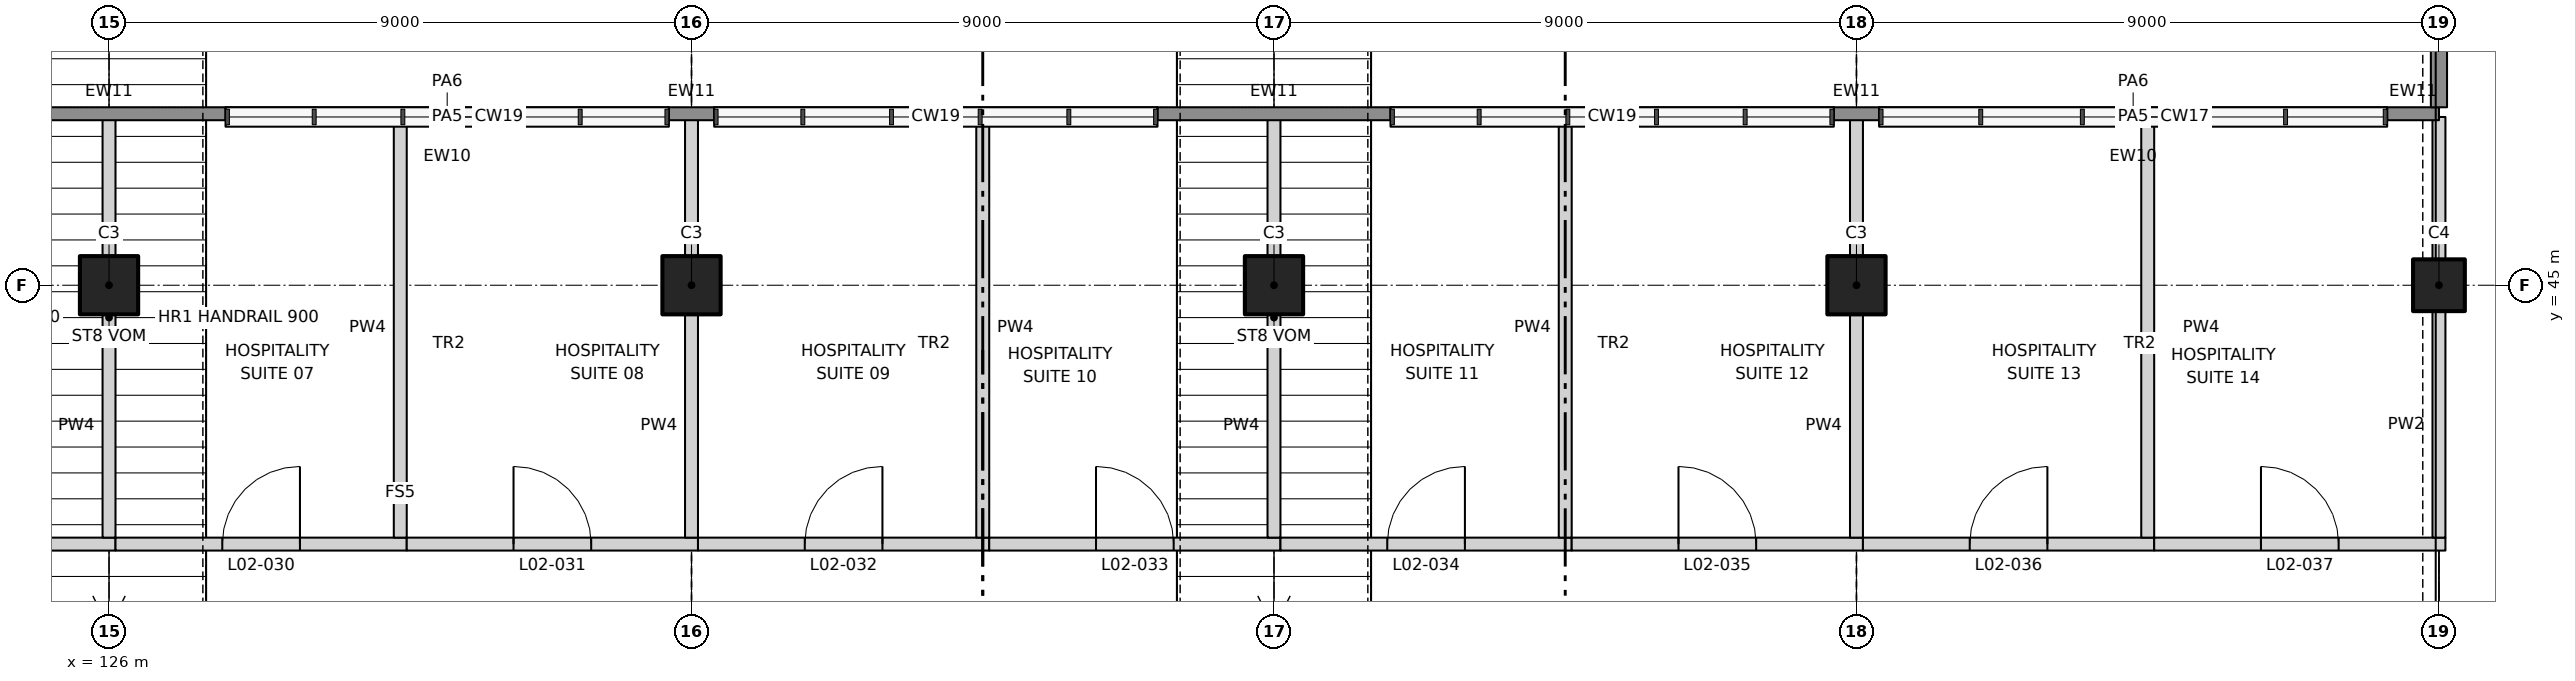
"""IFC4 building model, lengths in metres.
Left out: names, types, materials, properties, quantities, classifications, styles, units other than length and angle.
Written with IfcOpenShell. Run it as: python <this file> out.ifc"""

import sys

from ifc_helpers import new_model, si_unit, direction, frame, frame_2d, origin, origin_2d, place, context, subcontext, project, spatial, polyline, rectangle, outline, extrude, element, fill, save


model = new_model("IFC4")
c1 = context("Model", 3, precision=1e-05, world=origin(), true_north=direction((0.0, 1.0)))
c2 = subcontext(c1, "Body", "Model", "MODEL_VIEW")
j1 = project(units=[si_unit("LENGTHUNIT", "METRE"), si_unit("PLANEANGLEUNIT", "RADIAN")], contexts=[c1])
p1 = place(None, origin())
s1 = spatial("IfcSite", under=j1, at=p1, CompositionType="ELEMENT")
p2 = place(p1, origin())
s2 = spatial("IfcBuilding", under=s1, at=p2, CompositionType="ELEMENT")
p3 = place(p2, frame((0.0, 0.0, 11.5)))
s3 = spatial("IfcBuildingStorey", under=s2, at=p3, CompositionType="ELEMENT", Elevation=11.5)
p4 = place(p3, frame((162.0, 45.0, 0.0), z_axis=(0.0, 0.0, 1.0), x_axis=(1.0, 0.0, 0.0)))
e1 = element("IfcColumn", 1, at=p4, inside=s3, PredefinedType="COLUMN", context=c2, shape_type="SweptSolid", body=[
    extrude(rectangle(XDim=0.8, YDim=0.8, at=origin_2d()), origin(), (0.0, 0.0, 1.0), 10.5),
])
for number, where, z_axis, x_axis in (
    (2, (126.0, 45.0, 0.0), (0.0, 0.0, 1.0), (1.0, 0.0, 0.0)),
    (3, (135.0, 45.0, 0.0), (0.0, 0.0, 1.0), (1.0, 0.0, 0.0)),
    (4, (144.0, 45.0, 0.0), (0.0, 0.0, 1.0), (1.0, 0.0, 0.0)),
    (5, (153.0, 45.0, 0.0), (0.0, 0.0, 1.0), (1.0, 0.0, 0.0)),
):
    element("IfcColumn", number, at=place(p3, frame(where, z_axis=z_axis, x_axis=x_axis)), inside=s3, PredefinedType="COLUMN", context=c2, shape_type="SweptSolid", body=[
        extrude(rectangle(XDim=0.9, YDim=0.9, at=origin_2d()), origin(), (0.0, 0.0, 1.0), 4.506),
    ])
p5 = place(p3, frame((121.6, 41.0, 0.0), z_axis=(0.0, 0.0, 1.0), x_axis=(1.0, 0.0, 0.0)))
e6 = element("IfcWall", 6, at=p5, inside=s3, PredefinedType="PARTITIONING", context=c2, shape_type="SweptSolid", body=[
    extrude(rectangle(XDim=4.5, YDim=0.2, at=frame_2d((2.25, 0.0))), origin(), (0.0, 0.0, 1.0), 8.258),
])
p6 = place(p5, frame((1.65, 0.0, 0.0)))
e7 = element("IfcOpeningElement", 7, at=p6, cuts=e6, PredefinedType="OPENING", context=c2, shape_type="SweptSolid", body=[
    extrude(rectangle(XDim=1.2, YDim=2.1, at=frame_2d((0.6, 1.05))), frame((0.0, 0.11, 0.0), z_axis=(0.0, -1.0, 0.0), x_axis=(1.0, 0.0, 0.0)), (0.0, 0.0, 1.0), 0.22),
])
p7 = place(p3, frame((126.1, 41.0, 0.0), z_axis=(0.0, 0.0, 1.0), x_axis=(1.0, 0.0, 0.0)))
e8 = element("IfcWall", 8, at=p7, inside=s3, PredefinedType="PARTITIONING", context=c2, shape_type="SweptSolid", body=[
    extrude(rectangle(XDim=4.5, YDim=0.2, at=frame_2d((2.25, 0.0))), origin(), (0.0, 0.0, 1.0), 8.258),
])
p8 = place(p7, frame((1.65, 0.0, 0.0)))
e9 = element("IfcOpeningElement", 9, at=p8, cuts=e8, PredefinedType="OPENING", context=c2, shape_type="SweptSolid", body=[
    extrude(rectangle(XDim=1.2, YDim=2.1, at=frame_2d((0.6, 1.05))), frame((0.0, 0.11, 0.0), z_axis=(0.0, -1.0, 0.0), x_axis=(1.0, 0.0, 0.0)), (0.0, 0.0, 1.0), 0.22),
])
p9 = place(p3, frame((130.6, 41.0, 0.0), z_axis=(0.0, 0.0, 1.0), x_axis=(1.0, 0.0, 0.0)))
e10 = element("IfcWall", 10, at=p9, inside=s3, PredefinedType="PARTITIONING", context=c2, shape_type="SweptSolid", body=[
    extrude(rectangle(XDim=4.5, YDim=0.2, at=frame_2d((2.25, 0.0))), origin(), (0.0, 0.0, 1.0), 8.258),
])
p10 = place(p9, frame((1.65, 0.0, 0.0)))
e11 = element("IfcOpeningElement", 11, at=p10, cuts=e10, PredefinedType="OPENING", context=c2, shape_type="SweptSolid", body=[
    extrude(rectangle(XDim=1.2, YDim=2.1, at=frame_2d((0.6, 1.05))), frame((0.0, 0.11, 0.0), z_axis=(0.0, -1.0, 0.0), x_axis=(1.0, 0.0, 0.0)), (0.0, 0.0, 1.0), 0.22),
])
p11 = place(p3, frame((135.1, 41.0, 0.0), z_axis=(0.0, 0.0, 1.0), x_axis=(1.0, 0.0, 0.0)))
e12 = element("IfcWall", 12, at=p11, inside=s3, PredefinedType="PARTITIONING", context=c2, shape_type="SweptSolid", body=[
    extrude(rectangle(XDim=4.5, YDim=0.2, at=frame_2d((2.25, 0.0))), origin(), (0.0, 0.0, 1.0), 8.258),
])
p12 = place(p11, frame((1.65, 0.0, 0.0)))
e13 = element("IfcOpeningElement", 13, at=p12, cuts=e12, PredefinedType="OPENING", context=c2, shape_type="SweptSolid", body=[
    extrude(rectangle(XDim=1.2, YDim=2.1, at=frame_2d((0.6, 1.05))), frame((0.0, 0.11, 0.0), z_axis=(0.0, -1.0, 0.0), x_axis=(1.0, 0.0, 0.0)), (0.0, 0.0, 1.0), 0.22),
])
p13 = place(p3, frame((139.6, 41.0, 0.0), z_axis=(0.0, 0.0, 1.0), x_axis=(1.0, 0.0, 0.0)))
e14 = element("IfcWall", 14, at=p13, inside=s3, PredefinedType="PARTITIONING", context=c2, shape_type="SweptSolid", body=[
    extrude(rectangle(XDim=4.5, YDim=0.2, at=frame_2d((2.25, 0.0))), origin(), (0.0, 0.0, 1.0), 8.258),
])
p14 = place(p13, frame((1.65, 0.0, 0.0)))
e15 = element("IfcOpeningElement", 15, at=p14, cuts=e14, PredefinedType="OPENING", context=c2, shape_type="SweptSolid", body=[
    extrude(rectangle(XDim=1.2, YDim=2.1, at=frame_2d((0.6, 1.05))), frame((0.0, 0.11, 0.0), z_axis=(0.0, -1.0, 0.0), x_axis=(1.0, 0.0, 0.0)), (0.0, 0.0, 1.0), 0.22),
])
p15 = place(p3, frame((144.1, 41.0, 0.0), z_axis=(0.0, 0.0, 1.0), x_axis=(1.0, 0.0, 0.0)))
e16 = element("IfcWall", 16, at=p15, inside=s3, PredefinedType="PARTITIONING", context=c2, shape_type="SweptSolid", body=[
    extrude(rectangle(XDim=4.5, YDim=0.2, at=frame_2d((2.25, 0.0))), origin(), (0.0, 0.0, 1.0), 8.258),
])
p16 = place(p15, frame((1.65, 0.0, 0.0)))
e17 = element("IfcOpeningElement", 17, at=p16, cuts=e16, PredefinedType="OPENING", context=c2, shape_type="SweptSolid", body=[
    extrude(rectangle(XDim=1.2, YDim=2.1, at=frame_2d((0.6, 1.05))), frame((0.0, 0.11, 0.0), z_axis=(0.0, -1.0, 0.0), x_axis=(1.0, 0.0, 0.0)), (0.0, 0.0, 1.0), 0.22),
])
p17 = place(p3, frame((148.6, 41.0, 0.0), z_axis=(0.0, 0.0, 1.0), x_axis=(1.0, 0.0, 0.0)))
e18 = element("IfcWall", 18, at=p17, inside=s3, PredefinedType="PARTITIONING", context=c2, shape_type="SweptSolid", body=[
    extrude(rectangle(XDim=4.5, YDim=0.2, at=frame_2d((2.25, 0.0))), origin(), (0.0, 0.0, 1.0), 8.258),
])
p18 = place(p17, frame((1.65, 0.0, 0.0)))
e19 = element("IfcOpeningElement", 19, at=p18, cuts=e18, PredefinedType="OPENING", context=c2, shape_type="SweptSolid", body=[
    extrude(rectangle(XDim=1.2, YDim=2.1, at=frame_2d((0.6, 1.05))), frame((0.0, 0.11, 0.0), z_axis=(0.0, -1.0, 0.0), x_axis=(1.0, 0.0, 0.0)), (0.0, 0.0, 1.0), 0.22),
])
p19 = place(p3, frame((153.1, 41.0, 0.0), z_axis=(0.0, 0.0, 1.0), x_axis=(1.0, 0.0, 0.0)))
e20 = element("IfcWall", 20, at=p19, inside=s3, PredefinedType="PARTITIONING", context=c2, shape_type="SweptSolid", body=[
    extrude(rectangle(XDim=4.5, YDim=0.2, at=frame_2d((2.25, 0.0))), origin(), (0.0, 0.0, 1.0), 8.258),
])
p20 = place(p19, frame((1.65, 0.0, 0.0)))
e21 = element("IfcOpeningElement", 21, at=p20, cuts=e20, PredefinedType="OPENING", context=c2, shape_type="SweptSolid", body=[
    extrude(rectangle(XDim=1.2, YDim=2.1, at=frame_2d((0.6, 1.05))), frame((0.0, 0.11, 0.0), z_axis=(0.0, -1.0, 0.0), x_axis=(1.0, 0.0, 0.0)), (0.0, 0.0, 1.0), 0.22),
])
p21 = place(p3, frame((157.6, 41.0, 0.0), z_axis=(0.0, 0.0, 1.0), x_axis=(1.0, 0.0, 0.0)))
e22 = element("IfcWall", 22, at=p21, inside=s3, PredefinedType="PARTITIONING", context=c2, shape_type="SweptSolid", body=[
    extrude(outline(polyline([(0.0, 0.0), (4.5, 0.0), (4.5, 10.5), (4.0, 8.258), (0.0, 8.258), (0.0, 0.0)])), frame((0.0, 0.1, 0.0), z_axis=(0.0, -1.0, 0.0), x_axis=(1.0, 0.0, 0.0)), (0.0, 0.0, 1.0), 0.2),
])
p22 = place(p21, frame((1.65, 0.0, 0.0)))
e23 = element("IfcOpeningElement", 23, at=p22, cuts=e22, PredefinedType="OPENING", context=c2, shape_type="SweptSolid", body=[
    extrude(rectangle(XDim=1.2, YDim=2.1, at=frame_2d((0.6, 1.05))), frame((0.0, 0.11, 0.0), z_axis=(0.0, -1.0, 0.0), x_axis=(1.0, 0.0, 0.0)), (0.0, 0.0, 1.0), 0.22),
])
p23 = place(p3, frame((126.0, 41.1, 0.0), z_axis=(0.0, 0.0, 1.0), x_axis=(0.0, 1.0, 0.0)))
e24 = element("IfcWall", 24, at=p23, inside=s3, PredefinedType="PARTITIONING", context=c2, shape_type="SweptSolid", body=[
    extrude(rectangle(XDim=3.45, YDim=0.2, at=frame_2d((1.725, 0.0))), origin(), (0.0, 0.0, 1.0), 4.439),
])
p24 = place(p3, frame((126.0, 45.45, 0.0), z_axis=(0.0, 0.0, 1.0), x_axis=(0.0, 1.0, 0.0)))
e25 = element("IfcWall", 25, at=p24, inside=s3, PredefinedType="PARTITIONING", context=c2, shape_type="SweptSolid", body=[
    extrude(rectangle(XDim=2.15, YDim=0.2, at=frame_2d((1.075, 0.0))), origin(), (0.0, 0.0, 1.0), 1.939),
])
p25 = place(p3, frame((130.5, 41.1, 0.0), z_axis=(0.0, 0.0, 1.0), x_axis=(0.0, 1.0, 0.0)))
e26 = element("IfcWall", 26, at=p25, inside=s3, PredefinedType="PARTITIONING", context=c2, shape_type="SweptSolid", body=[
    extrude(outline(polyline([(0.0, 0.0), (6.5, 0.0), (6.5, 4.133), (0.0, 8.195), (0.0, 0.0)])), frame((0.0, 0.1, 0.0), z_axis=(0.0, -1.0, 0.0), x_axis=(1.0, 0.0, 0.0)), (0.0, 0.0, 1.0), 0.2),
])
p26 = place(p3, frame((135.0, 41.1, 0.0), z_axis=(0.0, 0.0, 1.0), x_axis=(0.0, 1.0, 0.0)))
e27 = element("IfcWall", 27, at=p26, inside=s3, PredefinedType="PARTITIONING", context=c2, shape_type="SweptSolid", body=[
    extrude(rectangle(XDim=3.45, YDim=0.2, at=frame_2d((1.725, 0.0))), origin(), (0.0, 0.0, 1.0), 4.439),
])
p27 = place(p3, frame((135.0, 45.45, 0.0), z_axis=(0.0, 0.0, 1.0), x_axis=(0.0, 1.0, 0.0)))
e28 = element("IfcWall", 28, at=p27, inside=s3, PredefinedType="PARTITIONING", context=c2, shape_type="SweptSolid", body=[
    extrude(outline(polyline([(0.0, 0.0), (2.15, 0.0), (2.15, 2.833), (2.079, 2.877), (0.0, 2.877), (0.0, 0.0)])), frame((0.0, 0.1, 0.0), z_axis=(0.0, -1.0, 0.0), x_axis=(1.0, 0.0, 0.0)), (0.0, 0.0, 1.0), 0.2),
])
p28 = place(p3, frame((139.5, 41.1, 0.0), z_axis=(0.0, 0.0, 1.0), x_axis=(0.0, 1.0, 0.0)))
e29 = element("IfcWall", 29, at=p28, inside=s3, PredefinedType="PARTITIONING", context=c2, shape_type="SweptSolid", body=[
    extrude(outline(polyline([(0.0, 0.0), (6.5, 0.0), (6.5, 4.133), (0.0, 8.195), (0.0, 0.0)])), frame((0.0, 0.1, 0.0), z_axis=(0.0, -1.0, 0.0), x_axis=(1.0, 0.0, 0.0)), (0.0, 0.0, 1.0), 0.2),
])
p29 = place(p3, frame((144.0, 41.1, 0.0), z_axis=(0.0, 0.0, 1.0), x_axis=(0.0, 1.0, 0.0)))
e30 = element("IfcWall", 30, at=p29, inside=s3, PredefinedType="PARTITIONING", context=c2, shape_type="SweptSolid", body=[
    extrude(rectangle(XDim=3.45, YDim=0.2, at=frame_2d((1.725, 0.0))), origin(), (0.0, 0.0, 1.0), 4.439),
])
p30 = place(p3, frame((144.0, 45.45, 0.0), z_axis=(0.0, 0.0, 1.0), x_axis=(0.0, 1.0, 0.0)))
e31 = element("IfcWall", 31, at=p30, inside=s3, PredefinedType="PARTITIONING", context=c2, shape_type="SweptSolid", body=[
    extrude(rectangle(XDim=2.15, YDim=0.2, at=frame_2d((1.075, 0.0))), origin(), (0.0, 0.0, 1.0), 1.939),
])
p31 = place(p3, frame((148.5, 41.1, 0.0), z_axis=(0.0, 0.0, 1.0), x_axis=(0.0, 1.0, 0.0)))
e32 = element("IfcWall", 32, at=p31, inside=s3, PredefinedType="PARTITIONING", context=c2, shape_type="SweptSolid", body=[
    extrude(outline(polyline([(0.0, 0.0), (6.5, 0.0), (6.5, 4.133), (0.0, 8.195), (0.0, 0.0)])), frame((0.0, 0.1, 0.0), z_axis=(0.0, -1.0, 0.0), x_axis=(1.0, 0.0, 0.0)), (0.0, 0.0, 1.0), 0.2),
])
p32 = place(p3, frame((153.0, 41.1, 0.0), z_axis=(0.0, 0.0, 1.0), x_axis=(0.0, 1.0, 0.0)))
e33 = element("IfcWall", 33, at=p32, inside=s3, PredefinedType="PARTITIONING", context=c2, shape_type="SweptSolid", body=[
    extrude(rectangle(XDim=3.45, YDim=0.2, at=frame_2d((1.725, 0.0))), origin(), (0.0, 0.0, 1.0), 4.439),
])
p33 = place(p3, frame((153.0, 45.45, 0.0), z_axis=(0.0, 0.0, 1.0), x_axis=(0.0, 1.0, 0.0)))
e34 = element("IfcWall", 34, at=p33, inside=s3, PredefinedType="PARTITIONING", context=c2, shape_type="SweptSolid", body=[
    extrude(outline(polyline([(0.0, 0.0), (2.15, 0.0), (2.15, 2.833), (2.079, 2.877), (0.0, 2.877), (0.0, 0.0)])), frame((0.0, 0.1, 0.0), z_axis=(0.0, -1.0, 0.0), x_axis=(1.0, 0.0, 0.0)), (0.0, 0.0, 1.0), 0.2),
])
p34 = place(p3, frame((157.5, 41.1, 0.0), z_axis=(0.0, 0.0, 1.0), x_axis=(0.0, 1.0, 0.0)))
e35 = element("IfcWall", 35, at=p34, inside=s3, PredefinedType="PARTITIONING", context=c2, shape_type="SweptSolid", body=[
    extrude(outline(polyline([(0.0, 0.0), (6.5, 0.0), (6.5, 4.133), (0.0, 8.195), (0.0, 0.0)])), frame((0.0, 0.1, 0.0), z_axis=(0.0, -1.0, 0.0), x_axis=(1.0, 0.0, 0.0)), (0.0, 0.0, 1.0), 0.2),
])
p35 = place(p3, frame((162.0, 41.1, 0.0), z_axis=(0.0, 0.0, 1.0), x_axis=(0.0, 1.0, 0.0)))
e36 = element("IfcWall", 36, at=p35, inside=s3, PredefinedType="PARTITIONING", context=c2, shape_type="SweptSolid", body=[
    extrude(rectangle(XDim=3.5, YDim=0.2, at=frame_2d((1.75, 0.0))), origin(), (0.0, 0.0, 1.0), 4.439),
])
p36 = place(p3, frame((162.0, 45.4, 0.0), z_axis=(0.0, 0.0, 1.0), x_axis=(0.0, 1.0, 0.0)))
e37 = element("IfcWall", 37, at=p36, inside=s3, PredefinedType="PARTITIONING", context=c2, shape_type="SweptSolid", body=[
    extrude(rectangle(XDim=2.2, YDim=0.2, at=frame_2d((1.1, 0.0))), origin(), (0.0, 0.0, 1.0), 2.877),
])
for number, where, z_axis, x_axis in (
    (38, (127.8, 47.65, 0.0), (0.0, 0.0, 1.0), (1.0, 0.0, 0.0)),
    (39, (135.35, 47.65, 0.0), (0.0, 0.0, 1.0), (1.0, 0.0, 0.0)),
    (40, (145.8, 47.65, 0.0), (0.0, 0.0, 1.0), (1.0, 0.0, 0.0)),
):
    element("IfcWall", number, at=place(p3, frame(where, z_axis=z_axis, x_axis=x_axis)), inside=s3, PredefinedType="SOLIDWALL", context=c2, shape_type="SweptSolid", body=[
        extrude(rectangle(XDim=6.85, YDim=0.2, at=frame_2d((3.425, 0.0))), origin(), (0.0, 0.0, 1.0), 1.1),
    ])
p37 = place(p3, frame((153.35, 47.65, 0.0), z_axis=(0.0, 0.0, 1.0), x_axis=(1.0, 0.0, 0.0)))
e41 = element("IfcWall", 41, at=p37, inside=s3, PredefinedType="SOLIDWALL", context=c2, shape_type="SweptSolid", body=[
    extrude(rectangle(XDim=7.85, YDim=0.2, at=frame_2d((3.925, 0.0))), origin(), (0.0, 0.0, 1.0), 1.1),
])
p38 = place(p3, frame((124.2, 47.65, 0.0), z_axis=(0.0, 0.0, 1.0), x_axis=(1.0, 0.0, 0.0)))
e42 = element("IfcWall", 42, at=p38, inside=s3, PredefinedType="SOLIDWALL", context=c2, shape_type="SweptSolid", body=[
    extrude(rectangle(XDim=3.6, YDim=0.2, at=frame_2d((1.8, 0.0))), origin(), (0.0, 0.0, 1.0), 4.034),
])
p39 = place(p3, frame((134.65, 47.65, 0.0), z_axis=(0.0, 0.0, 1.0), x_axis=(1.0, 0.0, 0.0)))
e43 = element("IfcWall", 43, at=p39, inside=s3, PredefinedType="SOLIDWALL", context=c2, shape_type="SweptSolid", body=[
    extrude(rectangle(XDim=0.7, YDim=0.2, at=frame_2d((0.35, 0.0))), origin(), (0.0, 0.0, 1.0), 4.034),
])
p40 = place(p3, frame((142.2, 47.65, 0.0), z_axis=(0.0, 0.0, 1.0), x_axis=(1.0, 0.0, 0.0)))
e44 = element("IfcWall", 44, at=p40, inside=s3, PredefinedType="SOLIDWALL", context=c2, shape_type="SweptSolid", body=[
    extrude(rectangle(XDim=3.6, YDim=0.2, at=frame_2d((1.8, 0.0))), origin(), (0.0, 0.0, 1.0), 4.034),
])
p41 = place(p3, frame((152.65, 47.65, 0.0), z_axis=(0.0, 0.0, 1.0), x_axis=(1.0, 0.0, 0.0)))
e45 = element("IfcWall", 45, at=p41, inside=s3, PredefinedType="SOLIDWALL", context=c2, shape_type="SweptSolid", body=[
    extrude(rectangle(XDim=0.7, YDim=0.2, at=frame_2d((0.35, 0.0))), origin(), (0.0, 0.0, 1.0), 4.034),
])
p42 = place(p3, frame((161.2, 47.65, 0.0), z_axis=(0.0, 0.0, 1.0), x_axis=(1.0, 0.0, 0.0)))
e46 = element("IfcWall", 46, at=p42, inside=s3, PredefinedType="SOLIDWALL", context=c2, shape_type="SweptSolid", body=[
    extrude(rectangle(XDim=0.8, YDim=0.2, at=frame_2d((0.4, 0.0))), origin(), (0.0, 0.0, 1.0), 4.034),
])
p43 = place(p3, frame((162.0, 47.75, 0.0), z_axis=(0.0, 0.0, 1.0), x_axis=(0.0, 1.0, 0.0)))
e47 = element("IfcWall", 47, at=p43, inside=s3, PredefinedType="SOLIDWALL", context=c2, shape_type="SweptSolid", body=[
    extrude(rectangle(XDim=2.75, YDim=0.25, at=frame_2d((1.375, 0.0))), origin(), (0.0, 0.0, 1.0), 1.217),
])
p44 = place(p8, origin())
e48 = element("IfcDoor", 48, at=p44, inside=s3, OperationType="SINGLE_SWING_RIGHT", PredefinedType="DOOR", context=c2, shape_type="SweptSolid", body=[
    extrude(rectangle(XDim=1.2, YDim=2.1, at=frame_2d((0.6, 1.05))), frame((0.0, 0.025, 0.0), z_axis=(0.0, -1.0, 0.0), x_axis=(1.0, 0.0, 0.0)), (0.0, 0.0, 1.0), 0.05),
])
fill(e9, e48)
p45 = place(p10, origin())
e49 = element("IfcDoor", 49, at=p45, inside=s3, OperationType="SINGLE_SWING_LEFT", PredefinedType="DOOR", context=c2, shape_type="SweptSolid", body=[
    extrude(rectangle(XDim=1.2, YDim=2.1, at=frame_2d((0.6, 1.05))), frame((0.0, 0.025, 0.0), z_axis=(0.0, -1.0, 0.0), x_axis=(1.0, 0.0, 0.0)), (0.0, 0.0, 1.0), 0.05),
])
fill(e11, e49)
p46 = place(p12, origin())
e50 = element("IfcDoor", 50, at=p46, inside=s3, OperationType="SINGLE_SWING_RIGHT", PredefinedType="DOOR", context=c2, shape_type="SweptSolid", body=[
    extrude(rectangle(XDim=1.2, YDim=2.1, at=frame_2d((0.6, 1.05))), frame((0.0, 0.025, 0.0), z_axis=(0.0, -1.0, 0.0), x_axis=(1.0, 0.0, 0.0)), (0.0, 0.0, 1.0), 0.05),
])
fill(e13, e50)
p47 = place(p14, origin())
e51 = element("IfcDoor", 51, at=p47, inside=s3, OperationType="SINGLE_SWING_LEFT", PredefinedType="DOOR", context=c2, shape_type="SweptSolid", body=[
    extrude(rectangle(XDim=1.2, YDim=2.1, at=frame_2d((0.6, 1.05))), frame((0.0, 0.025, 0.0), z_axis=(0.0, -1.0, 0.0), x_axis=(1.0, 0.0, 0.0)), (0.0, 0.0, 1.0), 0.05),
])
fill(e15, e51)
p48 = place(p16, origin())
e52 = element("IfcDoor", 52, at=p48, inside=s3, OperationType="SINGLE_SWING_RIGHT", PredefinedType="DOOR", context=c2, shape_type="SweptSolid", body=[
    extrude(rectangle(XDim=1.2, YDim=2.1, at=frame_2d((0.6, 1.05))), frame((0.0, 0.025, 0.0), z_axis=(0.0, -1.0, 0.0), x_axis=(1.0, 0.0, 0.0)), (0.0, 0.0, 1.0), 0.05),
])
fill(e17, e52)
p49 = place(p18, origin())
e53 = element("IfcDoor", 53, at=p49, inside=s3, OperationType="SINGLE_SWING_LEFT", PredefinedType="DOOR", context=c2, shape_type="SweptSolid", body=[
    extrude(rectangle(XDim=1.2, YDim=2.1, at=frame_2d((0.6, 1.05))), frame((0.0, 0.025, 0.0), z_axis=(0.0, -1.0, 0.0), x_axis=(1.0, 0.0, 0.0)), (0.0, 0.0, 1.0), 0.05),
])
fill(e19, e53)
p50 = place(p20, origin())
e54 = element("IfcDoor", 54, at=p50, inside=s3, OperationType="SINGLE_SWING_RIGHT", PredefinedType="DOOR", context=c2, shape_type="SweptSolid", body=[
    extrude(rectangle(XDim=1.2, YDim=2.1, at=frame_2d((0.6, 1.05))), frame((0.0, 0.025, 0.0), z_axis=(0.0, -1.0, 0.0), x_axis=(1.0, 0.0, 0.0)), (0.0, 0.0, 1.0), 0.05),
])
fill(e21, e54)
p51 = place(p22, origin())
e55 = element("IfcDoor", 55, at=p51, inside=s3, OperationType="SINGLE_SWING_LEFT", PredefinedType="DOOR", context=c2, shape_type="SweptSolid", body=[
    extrude(rectangle(XDim=1.2, YDim=2.1, at=frame_2d((0.6, 1.05))), frame((0.0, 0.025, 0.0), z_axis=(0.0, -1.0, 0.0), x_axis=(1.0, 0.0, 0.0)), (0.0, 0.0, 1.0), 0.05),
])
fill(e23, e55)
save(model, sys.argv[1])
